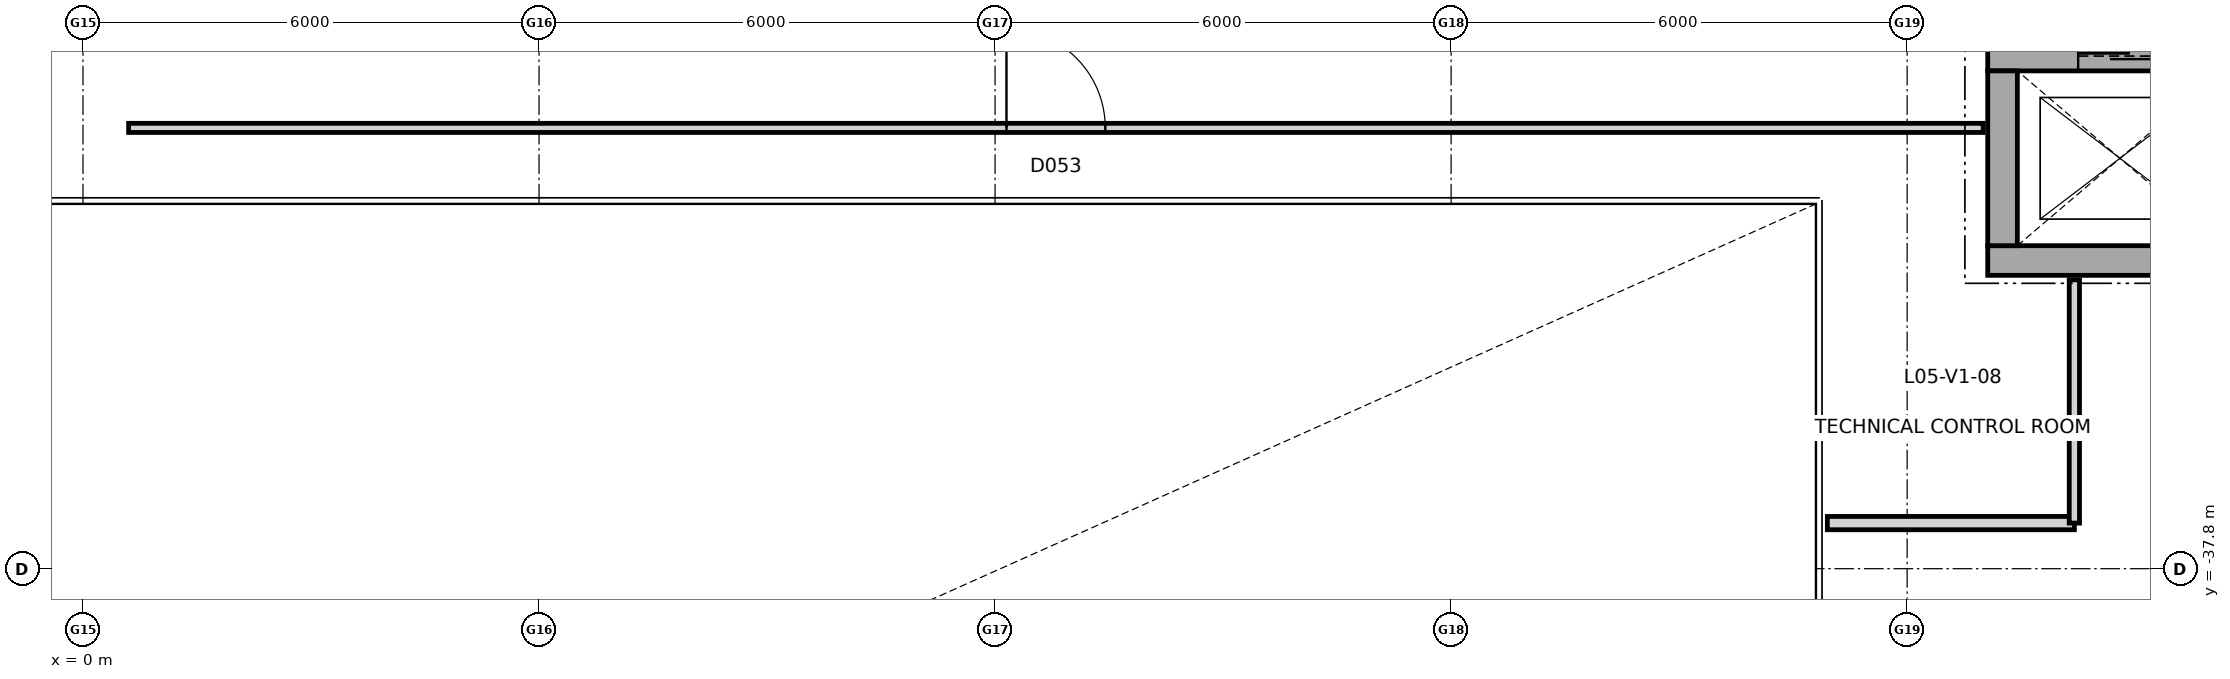
"""IFC4 building model, lengths in metres.
Left out: names, types, materials, properties, quantities, classifications, styles, units other than length and angle.
Written with IfcOpenShell. Run it as: python <this file> out.ifc"""

import sys

from ifc_helpers import new_model, si_unit, direction, frame, frame_2d, origin, place, context, subcontext, project, spatial, rectangle, extrude, element, fill, save


model = new_model("IFC4")
c1 = context("Model", 3, precision=1e-05, world=origin(), true_north=direction((0.0, 1.0)))
c2 = subcontext(c1, "Body", "Model", "MODEL_VIEW")
j1 = project(units=[si_unit("LENGTHUNIT", "METRE"), si_unit("PLANEANGLEUNIT", "RADIAN")], contexts=[c1])
p1 = place(None, origin())
s1 = spatial("IfcSite", under=j1, at=p1, CompositionType="ELEMENT")
p2 = place(p1, origin())
s2 = spatial("IfcBuilding", under=s1, at=p2, CompositionType="ELEMENT")
p3 = place(p2, frame((0.0, 0.0, 24.6)))
s3 = spatial("IfcBuildingStorey", under=s2, at=p3, CompositionType="ELEMENT", Elevation=24.6)
p4 = place(p3, frame((28.54, -33.745, 0.0), z_axis=(0.0, 0.0, 1.0), x_axis=(-1.0, 0.0, 0.0)))
e1 = element("IfcWall", 1, at=p4, inside=s3, PredefinedType="SHEAR", context=c2, shape_type="SweptSolid", body=[
    extrude(rectangle(XDim=3.48, YDim=0.39, at=frame_2d((1.74, 0.0))), origin(), (0.0, 0.0, 1.0), 3.619),
])
p5 = place(p3, frame((25.06, -31.055, 0.0), z_axis=(0.0, 0.0, 1.0), x_axis=(1.0, 0.0, 0.0)))
e2 = element("IfcWall", 2, at=p5, inside=s3, PredefinedType="SHEAR", context=c2, shape_type="SweptSolid", body=[
    extrude(rectangle(XDim=3.48, YDim=0.39, at=frame_2d((1.74, 0.0))), origin(), (0.0, 0.0, 1.0), 3.619),
])
p6 = place(p5, frame((1.19, 0.0, 0.0)))
e3 = element("IfcOpeningElement", 3, at=p6, cuts=e2, PredefinedType="OPENING", context=c2, shape_type="SweptSolid", body=[
    extrude(rectangle(XDim=1.1, YDim=2.15, at=frame_2d((0.55, 1.075))), frame((0.0, 0.205, 0.0), z_axis=(0.0, -1.0, 0.0), x_axis=(1.0, 0.0, 0.0)), (0.0, 0.0, 1.0), 0.41),
])
p7 = place(p3, frame((25.255, -33.55, 0.0), z_axis=(0.0, 0.0, 1.0), x_axis=(0.0, 1.0, 0.0)))
e4 = element("IfcWall", 4, at=p7, inside=s3, PredefinedType="SHEAR", context=c2, shape_type="SweptSolid", body=[
    extrude(rectangle(XDim=2.3, YDim=0.39, at=frame_2d((1.15, 0.0))), origin(), (0.0, 0.0, 1.0), 3.619),
])
p8 = place(p3, frame((22.95, -37.2, 0.0), z_axis=(0.0, 0.0, 1.0), x_axis=(1.0, 0.0, 0.0)))
e5 = element("IfcWall", 5, at=p8, inside=s3, PredefinedType="PARTITIONING", context=c2, shape_type="SweptSolid", body=[
    extrude(rectangle(XDim=3.25, YDim=0.175, at=frame_2d((1.625, 0.0))), origin(), (0.0, 0.0, 1.0), 5.02),
])
p9 = place(p3, frame((0.6, -32.0, 0.0), z_axis=(0.0, 0.0, 1.0), x_axis=(1.0, 0.0, 0.0)))
e6 = element("IfcWall", 6, at=p9, inside=s3, PredefinedType="PARTITIONING", context=c2, shape_type="SweptSolid", body=[
    extrude(rectangle(XDim=24.4, YDim=0.12, at=frame_2d((12.2, 0.0))), origin(), (0.0, 0.0, 1.0), 5.02),
])
p10 = place(p9, frame((11.55, 0.0, 0.0)))
e7 = element("IfcOpeningElement", 7, at=p10, cuts=e6, PredefinedType="OPENING", context=c2, shape_type="SweptSolid", body=[
    extrude(rectangle(XDim=1.3, YDim=2.25, at=frame_2d((0.65, 1.125))), frame((0.0, 0.07, 0.0), z_axis=(0.0, -1.0, 0.0), x_axis=(1.0, 0.0, 0.0)), (0.0, 0.0, 1.0), 0.14),
])
p11 = place(p3, frame((26.2, -37.2, 0.0), z_axis=(0.0, 0.0, 1.0), x_axis=(0.0, 1.0, 0.0)))
e8 = element("IfcWall", 8, at=p11, inside=s3, PredefinedType="PARTITIONING", context=c2, shape_type="SweptSolid", body=[
    extrude(rectangle(XDim=3.2, YDim=0.135, at=frame_2d((1.6, 0.0))), origin(), (0.0, 0.0, 1.0), 5.02),
])
p12 = place(p6, origin())
e9 = element("IfcDoor", 9, at=p12, inside=s3, OperationType="SLIDING_TO_LEFT", PredefinedType="DOOR", context=c2, shape_type="SweptSolid", body=[
    extrude(rectangle(XDim=1.1, YDim=2.15, at=frame_2d((0.55, 1.075))), frame((0.0, 0.025, 0.0), z_axis=(0.0, -1.0, 0.0), x_axis=(1.0, 0.0, 0.0)), (0.0, 0.0, 1.0), 0.05),
])
fill(e3, e9)
p13 = place(p10, origin())
e10 = element("IfcDoor", 10, at=p13, inside=s3, OperationType="SINGLE_SWING_LEFT", PredefinedType="DOOR", context=c2, shape_type="SweptSolid", body=[
    extrude(rectangle(XDim=1.3, YDim=2.25, at=frame_2d((0.65, 1.125))), frame((0.0, 0.025, 0.0), z_axis=(0.0, -1.0, 0.0), x_axis=(1.0, 0.0, 0.0)), (0.0, 0.0, 1.0), 0.05),
])
fill(e7, e10)
save(model, sys.argv[1])
